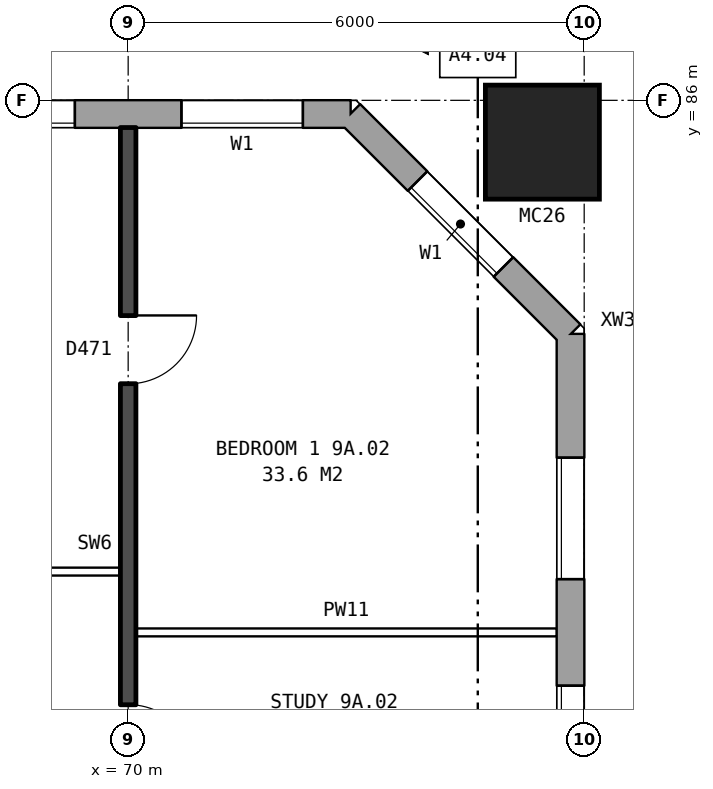
"""IFC4 building model, lengths in metres.
Left out: names, types, materials, properties, quantities, classifications, styles, units other than length and angle.
Written with IfcOpenShell. Run it as: python <this file> out.ifc"""

import sys

from ifc_helpers import new_model, si_unit, direction, frame, frame_2d, origin, origin_2d, place, context, subcontext, project, spatial, rectangle, hollow_rectangle, extrude, element, fill, save


model = new_model("IFC4")
c1 = context("Model", 3, precision=1e-05, world=origin(), true_north=direction((0.0, 1.0)))
c2 = subcontext(c1, "Body", "Model", "MODEL_VIEW")
j1 = project(units=[si_unit("LENGTHUNIT", "METRE"), si_unit("PLANEANGLEUNIT", "RADIAN")], contexts=[c1])
p1 = place(None, origin())
s1 = spatial("IfcSite", under=j1, at=p1, CompositionType="ELEMENT")
p2 = place(p1, origin())
s2 = spatial("IfcBuilding", under=s1, at=p2, CompositionType="ELEMENT")
p3 = place(p2, frame((0.0, 0.0, 35.0)))
s3 = spatial("IfcBuildingStorey", under=s2, at=p3, CompositionType="ELEMENT", Elevation=35.0)
p4 = place(p3, frame((75.45, 85.45, 0.0), z_axis=(0.0, 0.0, 1.0), x_axis=(1.0, 0.0, 0.0)))
e1 = element("IfcColumn", 1, at=p4, inside=s3, PredefinedType="COLUMN", context=c2, shape_type="SweptSolid", body=[
    extrude(hollow_rectangle(XDim=1.5, YDim=1.5, WallThickness=0.08, at=origin_2d()), origin(), (0.0, 0.0, 1.0), 3.1),
])
p5 = place(p3, frame((75.82, 57.075, 0.0), z_axis=(0.0, 0.0, 1.0), x_axis=(0.0, 1.0, 0.0)))
e2 = element("IfcWall", 2, at=p5, inside=s3, PredefinedType="STANDARD", context=c2, shape_type="SweptSolid", body=[
    extrude(rectangle(XDim=25.851, YDim=0.36, at=frame_2d((12.925, 0.0))), origin(), (0.0, 0.0, 1.0), 2.85),
])
p6 = place(p5, frame((1.625, 0.0, 0.8)))
e3 = element("IfcOpeningElement", 3, at=p6, cuts=e2, PredefinedType="OPENING", context=c2, shape_type="SweptSolid", body=[
    extrude(rectangle(XDim=1.6, YDim=1.8, at=frame_2d((0.8, 0.9))), frame((0.0, 0.19, 0.0), z_axis=(0.0, -1.0, 0.0), x_axis=(1.0, 0.0, 0.0)), (0.0, 0.0, 1.0), 0.38),
])
p7 = place(p5, frame((4.625, 0.0, 0.8)))
e4 = element("IfcOpeningElement", 4, at=p7, cuts=e2, PredefinedType="OPENING", context=c2, shape_type="SweptSolid", body=[
    extrude(rectangle(XDim=1.6, YDim=1.8, at=frame_2d((0.8, 0.9))), frame((0.0, 0.19, 0.0), z_axis=(0.0, -1.0, 0.0), x_axis=(1.0, 0.0, 0.0)), (0.0, 0.0, 1.0), 0.38),
])
p8 = place(p5, frame((19.625, 0.0, 0.8)))
e5 = element("IfcOpeningElement", 5, at=p8, cuts=e2, PredefinedType="OPENING", context=c2, shape_type="SweptSolid", body=[
    extrude(rectangle(XDim=1.6, YDim=1.8, at=frame_2d((0.8, 0.9))), frame((0.0, 0.19, 0.0), z_axis=(0.0, -1.0, 0.0), x_axis=(1.0, 0.0, 0.0)), (0.0, 0.0, 1.0), 0.38),
])
p9 = place(p5, frame((22.625, 0.0, 0.8)))
e6 = element("IfcOpeningElement", 6, at=p9, cuts=e2, PredefinedType="OPENING", context=c2, shape_type="SweptSolid", body=[
    extrude(rectangle(XDim=1.6, YDim=1.8, at=frame_2d((0.8, 0.9))), frame((0.0, 0.19, 0.0), z_axis=(0.0, -1.0, 0.0), x_axis=(1.0, 0.0, 0.0)), (0.0, 0.0, 1.0), 0.38),
])
p10 = place(p3, frame((75.82, 82.925, 0.0), z_axis=(0.0, 0.0, 1.0), x_axis=(-0.707106781187, 0.707106781187, 0.0)))
e7 = element("IfcWall", 7, at=p10, inside=s3, PredefinedType="STANDARD", context=c2, shape_type="SweptSolid", body=[
    extrude(rectangle(XDim=4.094, YDim=0.36, at=frame_2d((2.047, 0.0))), origin(), (0.0, 0.0, 1.0), 2.85),
])
p11 = place(p10, frame((1.247, 0.0, 0.8)))
e8 = element("IfcOpeningElement", 8, at=p11, cuts=e7, PredefinedType="OPENING", context=c2, shape_type="SweptSolid", body=[
    extrude(rectangle(XDim=1.6, YDim=1.8, at=frame_2d((0.8, 0.9))), frame((0.0, 0.19, 0.0), z_axis=(0.0, -1.0, 0.0), x_axis=(1.0, 0.0, 0.0)), (0.0, 0.0, 1.0), 0.38),
])
p12 = place(p3, frame((72.925, 85.82, 0.0), z_axis=(0.0, 0.0, 1.0), x_axis=(-1.0, 0.0, 0.0)))
e9 = element("IfcWall", 9, at=p12, inside=s3, PredefinedType="STANDARD", context=c2, shape_type="SweptSolid", body=[
    extrude(rectangle(XDim=50.101, YDim=0.36, at=frame_2d((25.05, 0.0))), origin(), (0.0, 0.0, 1.0), 2.85),
])
p13 = place(p12, frame((0.625, 0.0, 0.8)))
e10 = element("IfcOpeningElement", 10, at=p13, cuts=e9, PredefinedType="OPENING", context=c2, shape_type="SweptSolid", body=[
    extrude(rectangle(XDim=1.6, YDim=1.8, at=frame_2d((0.8, 0.9))), frame((0.0, 0.19, 0.0), z_axis=(0.0, -1.0, 0.0), x_axis=(1.0, 0.0, 0.0)), (0.0, 0.0, 1.0), 0.38),
])
p14 = place(p12, frame((3.625, 0.0, 0.8)))
e11 = element("IfcOpeningElement", 11, at=p14, cuts=e9, PredefinedType="OPENING", context=c2, shape_type="SweptSolid", body=[
    extrude(rectangle(XDim=1.6, YDim=1.8, at=frame_2d((0.8, 0.9))), frame((0.0, 0.19, 0.0), z_axis=(0.0, -1.0, 0.0), x_axis=(1.0, 0.0, 0.0)), (0.0, 0.0, 1.0), 0.38),
])
p15 = place(p12, frame((6.625, 0.0, 0.8)))
e12 = element("IfcOpeningElement", 12, at=p15, cuts=e9, PredefinedType="OPENING", context=c2, shape_type="SweptSolid", body=[
    extrude(rectangle(XDim=1.6, YDim=1.8, at=frame_2d((0.8, 0.9))), frame((0.0, 0.19, 0.0), z_axis=(0.0, -1.0, 0.0), x_axis=(1.0, 0.0, 0.0)), (0.0, 0.0, 1.0), 0.38),
])
p16 = place(p12, frame((9.625, 0.0, 0.8)))
e13 = element("IfcOpeningElement", 13, at=p16, cuts=e9, PredefinedType="OPENING", context=c2, shape_type="SweptSolid", body=[
    extrude(rectangle(XDim=1.6, YDim=1.8, at=frame_2d((0.8, 0.9))), frame((0.0, 0.19, 0.0), z_axis=(0.0, -1.0, 0.0), x_axis=(1.0, 0.0, 0.0)), (0.0, 0.0, 1.0), 0.38),
])
p17 = place(p12, frame((12.625, 0.0, 0.8)))
e14 = element("IfcOpeningElement", 14, at=p17, cuts=e9, PredefinedType="OPENING", context=c2, shape_type="SweptSolid", body=[
    extrude(rectangle(XDim=1.6, YDim=1.8, at=frame_2d((0.8, 0.9))), frame((0.0, 0.19, 0.0), z_axis=(0.0, -1.0, 0.0), x_axis=(1.0, 0.0, 0.0)), (0.0, 0.0, 1.0), 0.38),
])
p18 = place(p12, frame((15.625, 0.0, 0.8)))
e15 = element("IfcOpeningElement", 15, at=p18, cuts=e9, PredefinedType="OPENING", context=c2, shape_type="SweptSolid", body=[
    extrude(rectangle(XDim=1.6, YDim=1.8, at=frame_2d((0.8, 0.9))), frame((0.0, 0.19, 0.0), z_axis=(0.0, -1.0, 0.0), x_axis=(1.0, 0.0, 0.0)), (0.0, 0.0, 1.0), 0.38),
])
p19 = place(p12, frame((18.625, 0.0, 0.8)))
e16 = element("IfcOpeningElement", 16, at=p19, cuts=e9, PredefinedType="OPENING", context=c2, shape_type="SweptSolid", body=[
    extrude(rectangle(XDim=1.6, YDim=1.8, at=frame_2d((0.8, 0.9))), frame((0.0, 0.19, 0.0), z_axis=(0.0, -1.0, 0.0), x_axis=(1.0, 0.0, 0.0)), (0.0, 0.0, 1.0), 0.38),
])
p20 = place(p12, frame((21.125, 0.0, 1.1)))
e17 = element("IfcOpeningElement", 17, at=p20, cuts=e9, PredefinedType="OPENING", context=c2, shape_type="SweptSolid", body=[
    extrude(rectangle(XDim=0.8, YDim=1.5, at=frame_2d((0.4, 0.75))), frame((0.0, 0.19, 0.0), z_axis=(0.0, -1.0, 0.0), x_axis=(1.0, 0.0, 0.0)), (0.0, 0.0, 1.0), 0.38),
])
p21 = place(p12, frame((24.175, 0.0, 0.15)))
e18 = element("IfcOpeningElement", 18, at=p21, cuts=e9, PredefinedType="OPENING", context=c2, shape_type="SweptSolid", body=[
    extrude(rectangle(XDim=1.6, YDim=1.5, at=frame_2d((0.8, 0.75))), frame((0.0, 0.19, 0.0), z_axis=(0.0, -1.0, 0.0), x_axis=(1.0, 0.0, 0.0)), (0.0, 0.0, 1.0), 0.38),
])
p22 = place(p12, frame((27.275, 0.0, 1.7)))
e19 = element("IfcOpeningElement", 19, at=p22, cuts=e9, PredefinedType="OPENING", context=c2, shape_type="SweptSolid", body=[
    extrude(rectangle(XDim=1.2, YDim=0.9, at=frame_2d((0.6, 0.45))), frame((0.0, 0.19, 0.0), z_axis=(0.0, -1.0, 0.0), x_axis=(1.0, 0.0, 0.0)), (0.0, 0.0, 1.0), 0.38),
])
p23 = place(p12, frame((30.625, 0.0, 0.8)))
e20 = element("IfcOpeningElement", 20, at=p23, cuts=e9, PredefinedType="OPENING", context=c2, shape_type="SweptSolid", body=[
    extrude(rectangle(XDim=1.6, YDim=1.8, at=frame_2d((0.8, 0.9))), frame((0.0, 0.19, 0.0), z_axis=(0.0, -1.0, 0.0), x_axis=(1.0, 0.0, 0.0)), (0.0, 0.0, 1.0), 0.38),
])
p24 = place(p12, frame((33.625, 0.0, 0.8)))
e21 = element("IfcOpeningElement", 21, at=p24, cuts=e9, PredefinedType="OPENING", context=c2, shape_type="SweptSolid", body=[
    extrude(rectangle(XDim=1.6, YDim=1.8, at=frame_2d((0.8, 0.9))), frame((0.0, 0.19, 0.0), z_axis=(0.0, -1.0, 0.0), x_axis=(1.0, 0.0, 0.0)), (0.0, 0.0, 1.0), 0.38),
])
p25 = place(p12, frame((36.625, 0.0, 0.8)))
e22 = element("IfcOpeningElement", 22, at=p25, cuts=e9, PredefinedType="OPENING", context=c2, shape_type="SweptSolid", body=[
    extrude(rectangle(XDim=1.6, YDim=1.8, at=frame_2d((0.8, 0.9))), frame((0.0, 0.19, 0.0), z_axis=(0.0, -1.0, 0.0), x_axis=(1.0, 0.0, 0.0)), (0.0, 0.0, 1.0), 0.38),
])
p26 = place(p12, frame((39.625, 0.0, 0.8)))
e23 = element("IfcOpeningElement", 23, at=p26, cuts=e9, PredefinedType="OPENING", context=c2, shape_type="SweptSolid", body=[
    extrude(rectangle(XDim=1.6, YDim=1.8, at=frame_2d((0.8, 0.9))), frame((0.0, 0.19, 0.0), z_axis=(0.0, -1.0, 0.0), x_axis=(1.0, 0.0, 0.0)), (0.0, 0.0, 1.0), 0.38),
])
p27 = place(p12, frame((42.625, 0.0, 0.8)))
e24 = element("IfcOpeningElement", 24, at=p27, cuts=e9, PredefinedType="OPENING", context=c2, shape_type="SweptSolid", body=[
    extrude(rectangle(XDim=1.6, YDim=1.8, at=frame_2d((0.8, 0.9))), frame((0.0, 0.19, 0.0), z_axis=(0.0, -1.0, 0.0), x_axis=(1.0, 0.0, 0.0)), (0.0, 0.0, 1.0), 0.38),
])
p28 = place(p12, frame((45.625, 0.0, 0.8)))
e25 = element("IfcOpeningElement", 25, at=p28, cuts=e9, PredefinedType="OPENING", context=c2, shape_type="SweptSolid", body=[
    extrude(rectangle(XDim=1.6, YDim=1.8, at=frame_2d((0.8, 0.9))), frame((0.0, 0.19, 0.0), z_axis=(0.0, -1.0, 0.0), x_axis=(1.0, 0.0, 0.0)), (0.0, 0.0, 1.0), 0.38),
])
p29 = place(p12, frame((22.225, 0.0, 1.7)))
e26 = element("IfcOpeningElement", 26, at=p29, cuts=e9, PredefinedType="OPENING", context=c2, shape_type="SweptSolid", body=[
    extrude(rectangle(XDim=0.6, YDim=0.9, at=frame_2d((0.3, 0.45))), frame((0.0, 0.19, 0.0), z_axis=(0.0, -1.0, 0.0), x_axis=(1.0, 0.0, 0.0)), (0.0, 0.0, 1.0), 0.38),
])
p30 = place(p12, frame((26.075, 0.0, 0.25)))
e27 = element("IfcOpeningElement", 27, at=p30, cuts=e9, PredefinedType="OPENING", context=c2, shape_type="SweptSolid", body=[
    extrude(rectangle(XDim=0.6, YDim=0.9, at=frame_2d((0.3, 0.45))), frame((0.0, 0.19, 0.0), z_axis=(0.0, -1.0, 0.0), x_axis=(1.0, 0.0, 0.0)), (0.0, 0.0, 1.0), 0.38),
])
p31 = place(p12, frame((28.775, 0.0, 0.8)))
e28 = element("IfcOpeningElement", 28, at=p31, cuts=e9, PredefinedType="OPENING", context=c2, shape_type="SweptSolid", body=[
    extrude(rectangle(XDim=1.4, YDim=1.8, at=frame_2d((0.7, 0.9))), frame((0.0, 0.19, 0.0), z_axis=(0.0, -1.0, 0.0), x_axis=(1.0, 0.0, 0.0)), (0.0, 0.0, 1.0), 0.38),
])
p32 = place(p3, frame((70.1, 79.0, 0.0), z_axis=(0.0, 0.0, 1.0), x_axis=(1.0, 0.0, 0.0)))
e29 = element("IfcWall", 29, at=p32, inside=s3, PredefinedType="PARTITIONING", context=c2, shape_type="SweptSolid", body=[
    extrude(rectangle(XDim=5.54, YDim=0.1, at=frame_2d((2.77, 0.0))), origin(), (0.0, 0.0, 1.0), 2.85),
])
p33 = place(p3, frame((64.1, 79.8, 0.0), z_axis=(0.0, 0.0, 1.0), x_axis=(1.0, 0.0, 0.0)))
e30 = element("IfcWall", 30, at=p33, inside=s3, PredefinedType="PARTITIONING", context=c2, shape_type="SweptSolid", body=[
    extrude(rectangle(XDim=5.8, YDim=0.1, at=frame_2d((2.9, 0.0))), origin(), (0.0, 0.0, 1.0), 2.85),
])
p34 = place(p33, frame((3.6, 0.0, 0.0)))
e31 = element("IfcOpeningElement", 31, at=p34, cuts=e30, PredefinedType="OPENING", context=c2, shape_type="SweptSolid", body=[
    extrude(rectangle(XDim=0.9, YDim=2.1, at=frame_2d((0.45, 1.05))), frame((0.0, 0.06, 0.0), z_axis=(0.0, -1.0, 0.0), x_axis=(1.0, 0.0, 0.0)), (0.0, 0.0, 1.0), 0.12),
])
p35 = place(p33, frame((0.7, 0.0, 0.0)))
e32 = element("IfcOpeningElement", 32, at=p35, cuts=e30, PredefinedType="OPENING", context=c2, shape_type="SweptSolid", body=[
    extrude(rectangle(XDim=0.9, YDim=2.1, at=frame_2d((0.45, 1.05))), frame((0.0, 0.06, 0.0), z_axis=(0.0, -1.0, 0.0), x_axis=(1.0, 0.0, 0.0)), (0.0, 0.0, 1.0), 0.12),
])
p36 = place(p3, frame((70.0, 76.2, 0.0), z_axis=(0.0, 0.0, 1.0), x_axis=(0.0, 1.0, 0.0)))
e33 = element("IfcWall", 33, at=p36, inside=s3, PredefinedType="SOLIDWALL", context=c2, shape_type="SweptSolid", body=[
    extrude(rectangle(XDim=9.44, YDim=0.2, at=frame_2d((4.72, 0.0))), origin(), (0.0, 0.0, 1.0), 2.85),
])
p37 = place(p36, frame((6.07, 0.0, 0.0)))
e34 = element("IfcOpeningElement", 34, at=p37, cuts=e33, PredefinedType="OPENING", context=c2, shape_type="SweptSolid", body=[
    extrude(rectangle(XDim=0.9, YDim=2.1, at=frame_2d((0.45, 1.05))), frame((0.0, 0.11, 0.0), z_axis=(0.0, -1.0, 0.0), x_axis=(1.0, 0.0, 0.0)), (0.0, 0.0, 1.0), 0.22),
])
p38 = place(p36, frame((0.95, 0.0, 0.0)))
e35 = element("IfcOpeningElement", 35, at=p38, cuts=e33, PredefinedType="OPENING", context=c2, shape_type="SweptSolid", body=[
    extrude(rectangle(XDim=0.9, YDim=2.1, at=frame_2d((0.45, 1.05))), frame((0.0, 0.11, 0.0), z_axis=(0.0, -1.0, 0.0), x_axis=(1.0, 0.0, 0.0)), (0.0, 0.0, 1.0), 0.22),
])
p39 = place(p8, origin())
e36 = element("IfcWindow", 36, at=p39, inside=s3, PartitioningType="SINGLE_PANEL", PredefinedType="WINDOW", context=c2, shape_type="SweptSolid", body=[
    extrude(rectangle(XDim=1.6, YDim=1.8, at=frame_2d((0.8, 0.9))), frame((0.0, 0.15, 0.0), z_axis=(0.0, -1.0, 0.0), x_axis=(1.0, 0.0, 0.0)), (0.0, 0.0, 1.0), 0.06),
])
fill(e5, e36)
p40 = place(p9, origin())
e37 = element("IfcWindow", 37, at=p40, inside=s3, PartitioningType="SINGLE_PANEL", PredefinedType="WINDOW", context=c2, shape_type="SweptSolid", body=[
    extrude(rectangle(XDim=1.6, YDim=1.8, at=frame_2d((0.8, 0.9))), frame((0.0, 0.15, 0.0), z_axis=(0.0, -1.0, 0.0), x_axis=(1.0, 0.0, 0.0)), (0.0, 0.0, 1.0), 0.06),
])
fill(e6, e37)
p41 = place(p11, origin())
e38 = element("IfcWindow", 38, at=p41, inside=s3, PartitioningType="SINGLE_PANEL", PredefinedType="WINDOW", context=c2, shape_type="SweptSolid", body=[
    extrude(rectangle(XDim=1.6, YDim=1.8, at=frame_2d((0.8, 0.9))), frame((0.0, 0.15, 0.0), z_axis=(0.0, -1.0, 0.0), x_axis=(1.0, 0.0, 0.0)), (0.0, 0.0, 1.0), 0.06),
])
fill(e8, e38)
p42 = place(p13, origin())
e39 = element("IfcWindow", 39, at=p42, inside=s3, PartitioningType="SINGLE_PANEL", PredefinedType="WINDOW", context=c2, shape_type="SweptSolid", body=[
    extrude(rectangle(XDim=1.6, YDim=1.8, at=frame_2d((0.8, 0.9))), frame((0.0, 0.15, 0.0), z_axis=(0.0, -1.0, 0.0), x_axis=(1.0, 0.0, 0.0)), (0.0, 0.0, 1.0), 0.06),
])
fill(e10, e39)
p43 = place(p14, origin())
e40 = element("IfcWindow", 40, at=p43, inside=s3, PartitioningType="SINGLE_PANEL", PredefinedType="WINDOW", context=c2, shape_type="SweptSolid", body=[
    extrude(rectangle(XDim=1.6, YDim=1.8, at=frame_2d((0.8, 0.9))), frame((0.0, 0.15, 0.0), z_axis=(0.0, -1.0, 0.0), x_axis=(1.0, 0.0, 0.0)), (0.0, 0.0, 1.0), 0.06),
])
fill(e11, e40)
p44 = place(p37, frame((0.9, 0.0, 0.0), z_axis=(0.0, 0.0, 1.0), x_axis=(-1.0, 0.0, 0.0)))
e41 = element("IfcDoor", 41, at=p44, inside=s3, OperationType="SINGLE_SWING_LEFT", PredefinedType="DOOR", context=c2, shape_type="SweptSolid", body=[
    extrude(rectangle(XDim=0.9, YDim=2.1, at=frame_2d((0.45, 1.05))), frame((0.0, 0.025, 0.0), z_axis=(0.0, -1.0, 0.0), x_axis=(1.0, 0.0, 0.0)), (0.0, 0.0, 1.0), 0.05),
])
fill(e34, e41)
p45 = place(p38, frame((0.9, 0.0, 0.0), z_axis=(0.0, 0.0, 1.0), x_axis=(-1.0, 0.0, 0.0)))
e42 = element("IfcDoor", 42, at=p45, inside=s3, OperationType="SINGLE_SWING_RIGHT", PredefinedType="DOOR", context=c2, shape_type="SweptSolid", body=[
    extrude(rectangle(XDim=0.9, YDim=2.1, at=frame_2d((0.45, 1.05))), frame((0.0, 0.025, 0.0), z_axis=(0.0, -1.0, 0.0), x_axis=(1.0, 0.0, 0.0)), (0.0, 0.0, 1.0), 0.05),
])
fill(e35, e42)
save(model, sys.argv[1])
